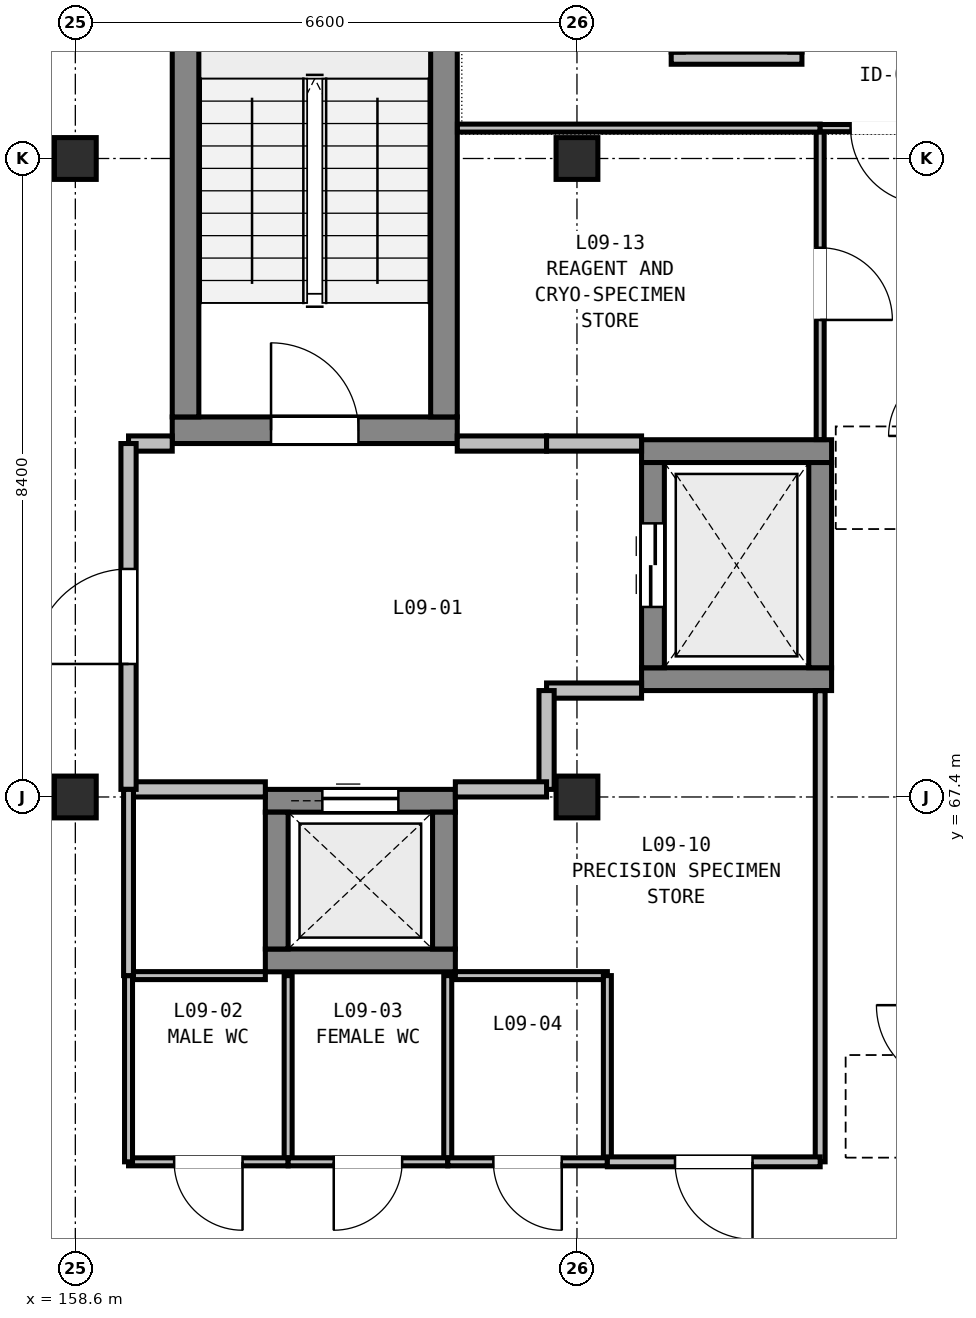
"""IFC4 building model, lengths in metres.
Left out: names, types, materials, properties, quantities, classifications, styles, units other than length and angle.
Written with IfcOpenShell. Run it as: python <this file> out.ifc"""

import sys

from ifc_helpers import new_model, si_unit, direction, frame, frame_2d, origin, origin_2d, place, context, subcontext, project, spatial, rectangle, extrude, element, fill, save


model = new_model("IFC4")
c1 = context("Model", 3, precision=1e-05, world=origin(), true_north=direction((0.0, 1.0)))
c2 = subcontext(c1, "Body", "Model", "MODEL_VIEW")
j1 = project(units=[si_unit("LENGTHUNIT", "METRE"), si_unit("PLANEANGLEUNIT", "RADIAN")], contexts=[c1])
p1 = place(None, origin())
s1 = spatial("IfcSite", under=j1, at=p1, CompositionType="ELEMENT")
p2 = place(p1, origin())
s2 = spatial("IfcBuilding", under=s1, at=p2, CompositionType="ELEMENT")
p3 = place(p2, frame((0.0, 0.0, 40.5)))
s3 = spatial("IfcBuildingStorey", under=s2, at=p3, CompositionType="ELEMENT", Elevation=40.5)
for number, where, z_axis, x_axis in (
    (1, (158.6, 67.4, 0.0), (0.0, 0.0, 1.0), (1.0, 0.0, 0.0)),
    (2, (158.6, 75.8, 0.0), (0.0, 0.0, 1.0), (1.0, 0.0, 0.0)),
    (3, (165.2, 67.4, 0.0), (0.0, 0.0, 1.0), (1.0, 0.0, 0.0)),
    (4, (165.2, 75.8, 0.0), (0.0, 0.0, 1.0), (1.0, 0.0, 0.0)),
):
    element("IfcColumn", number, at=place(p3, frame(where, z_axis=z_axis, x_axis=x_axis)), inside=s3, PredefinedType="COLUMN", context=c2, shape_type="SweptSolid", body=[
        extrude(rectangle(XDim=0.55, YDim=0.55, at=origin_2d()), origin(), (0.0, 0.0, 1.0), 3.9),
    ])
p4 = place(p3, frame((159.875, 72.225, 0.0), z_axis=(0.0, 0.0, 1.0), x_axis=(1.0, 0.0, 0.0)))
e5 = element("IfcWall", 5, at=p4, inside=s3, PredefinedType="SHEAR", context=c2, shape_type="SweptSolid", body=[
    extrude(rectangle(XDim=3.75, YDim=0.35, at=frame_2d((1.875, 0.0))), origin(), (0.0, 0.0, 1.0), 3.9),
])
p5 = place(p4, frame((1.3, 0.0, 0.0)))
e6 = element("IfcOpeningElement", 6, at=p5, cuts=e5, PredefinedType="OPENING", context=c2, shape_type="SweptSolid", body=[
    extrude(rectangle(XDim=1.15, YDim=2.15, at=frame_2d((0.575, 1.075))), frame((0.0, 0.185, 0.0), z_axis=(0.0, -1.0, 0.0), x_axis=(1.0, 0.0, 0.0)), (0.0, 0.0, 1.0), 0.37),
])
for number, where, z_axis, x_axis in (
    (7, (160.05, 72.4, 0.0), (0.0, 0.0, 1.0), (0.0, 1.0, 0.0)),
    (8, (163.45, 72.4, 0.0), (0.0, 0.0, 1.0), (0.0, 1.0, 0.0)),
):
    element("IfcWall", number, at=place(p3, frame(where, z_axis=z_axis, x_axis=x_axis)), inside=s3, PredefinedType="SHEAR", context=c2, shape_type="SweptSolid", body=[
        extrude(rectangle(XDim=7.375, YDim=0.35, at=frame_2d((3.688, 0.0))), origin(), (0.0, 0.0, 1.0), 3.9),
    ])
for number, where, z_axis, x_axis in (
    (9, (166.05, 68.95, 0.0), (0.0, 0.0, 1.0), (1.0, 0.0, 0.0)),
    (10, (166.05, 71.95, 0.0), (0.0, 0.0, 1.0), (1.0, 0.0, 0.0)),
):
    element("IfcWall", number, at=place(p3, frame(where, z_axis=z_axis, x_axis=x_axis)), inside=s3, PredefinedType="SHEAR", context=c2, shape_type="SweptSolid", body=[
        extrude(rectangle(XDim=2.5, YDim=0.3, at=frame_2d((1.25, 0.0))), origin(), (0.0, 0.0, 1.0), 3.9),
    ])
p6 = place(p3, frame((166.2, 69.1, 0.0), z_axis=(0.0, 0.0, 1.0), x_axis=(0.0, 1.0, 0.0)))
e11 = element("IfcWall", 11, at=p6, inside=s3, PredefinedType="SHEAR", context=c2, shape_type="SweptSolid", body=[
    extrude(rectangle(XDim=2.7, YDim=0.3, at=frame_2d((1.35, 0.0))), origin(), (0.0, 0.0, 1.0), 3.9),
])
p7 = place(p6, frame((0.8, 0.0, 0.0)))
e12 = element("IfcOpeningElement", 12, at=p7, cuts=e11, PredefinedType="OPENING", context=c2, shape_type="SweptSolid", body=[
    extrude(rectangle(XDim=1.1, YDim=2.1, at=frame_2d((0.55, 1.05))), frame((0.0, 0.16, 0.0), z_axis=(0.0, -1.0, 0.0), x_axis=(1.0, 0.0, 0.0)), (0.0, 0.0, 1.0), 0.32),
])
p8 = place(p3, frame((168.4, 69.1, 0.0), z_axis=(0.0, 0.0, 1.0), x_axis=(0.0, 1.0, 0.0)))
e13 = element("IfcWall", 13, at=p8, inside=s3, PredefinedType="SHEAR", context=c2, shape_type="SweptSolid", body=[
    extrude(rectangle(XDim=2.7, YDim=0.3, at=frame_2d((1.35, 0.0))), origin(), (0.0, 0.0, 1.0), 3.9),
])
p9 = place(p3, frame((161.1, 65.25, 0.0), z_axis=(0.0, 0.0, 1.0), x_axis=(1.0, 0.0, 0.0)))
e14 = element("IfcWall", 14, at=p9, inside=s3, PredefinedType="SHEAR", context=c2, shape_type="SweptSolid", body=[
    extrude(rectangle(XDim=2.5, YDim=0.3, at=frame_2d((1.25, 0.0))), origin(), (0.0, 0.0, 1.0), 3.9),
])
p10 = place(p3, frame((161.1, 67.35, 0.0), z_axis=(0.0, 0.0, 1.0), x_axis=(1.0, 0.0, 0.0)))
e15 = element("IfcWall", 15, at=p10, inside=s3, PredefinedType="SHEAR", context=c2, shape_type="SweptSolid", body=[
    extrude(rectangle(XDim=2.5, YDim=0.3, at=frame_2d((1.25, 0.0))), origin(), (0.0, 0.0, 1.0), 3.9),
])
p11 = place(p10, frame((0.75, 0.0, 0.0)))
e16 = element("IfcOpeningElement", 16, at=p11, cuts=e15, PredefinedType="OPENING", context=c2, shape_type="SweptSolid", body=[
    extrude(rectangle(XDim=1.0, YDim=2.1, at=frame_2d((0.5, 1.05))), frame((0.0, 0.16, 0.0), z_axis=(0.0, -1.0, 0.0), x_axis=(1.0, 0.0, 0.0)), (0.0, 0.0, 1.0), 0.32),
])
for number, where, z_axis, x_axis in (
    (17, (161.25, 65.4, 0.0), (0.0, 0.0, 1.0), (0.0, 1.0, 0.0)),
    (18, (163.45, 65.4, 0.0), (0.0, 0.0, 1.0), (0.0, 1.0, 0.0)),
):
    element("IfcWall", number, at=place(p3, frame(where, z_axis=z_axis, x_axis=x_axis)), inside=s3, PredefinedType="SHEAR", context=c2, shape_type="SweptSolid", body=[
        extrude(rectangle(XDim=1.8, YDim=0.3, at=frame_2d((0.9, 0.0))), origin(), (0.0, 0.0, 1.0), 3.9),
    ])
p12 = place(p3, frame((166.44, 77.12, 0.0), z_axis=(0.0, 0.0, 1.0), x_axis=(1.0, 0.0, 0.0)))
e19 = element("IfcWall", 19, at=p12, inside=s3, PredefinedType="PARTITIONING", context=c2, shape_type="SweptSolid", body=[
    extrude(rectangle(XDim=1.72, YDim=0.16, at=frame_2d((0.86, 0.0))), origin(), (0.0, 0.0, 1.0), 3.655),
])
p13 = place(p3, frame((159.3, 72.05, 0.0), z_axis=(0.0, 0.0, 1.0), x_axis=(1.0, 0.0, 0.0)))
e20 = element("IfcWall", 20, at=p13, inside=s3, PredefinedType="PARTITIONING", context=c2, shape_type="SweptSolid", body=[
    extrude(rectangle(XDim=0.575, YDim=0.2, at=frame_2d((0.288, 0.0))), origin(), (0.0, 0.0, 1.0), 3.655),
])
p14 = place(p3, frame((163.625, 72.05, 0.0), z_axis=(0.0, 0.0, 1.0), x_axis=(1.0, 0.0, 0.0)))
e21 = element("IfcWall", 21, at=p14, inside=s3, PredefinedType="PARTITIONING", context=c2, shape_type="SweptSolid", body=[
    extrude(rectangle(XDim=1.175, YDim=0.2, at=frame_2d((0.587, 0.0))), origin(), (0.0, 0.0, 1.0), 3.655),
])
for number, where, z_axis, x_axis in (
    (22, (164.8, 72.05, 0.0), (0.0, 0.0, 1.0), (1.0, 0.0, 0.0)),
    (23, (166.05, 68.8, 0.0), (0.0, 0.0, 1.0), (-1.0, 0.0, 0.0)),
):
    element("IfcWall", number, at=place(p3, frame(where, z_axis=z_axis, x_axis=x_axis)), inside=s3, PredefinedType="PARTITIONING", context=c2, shape_type="SweptSolid", body=[
        extrude(rectangle(XDim=1.25, YDim=0.2, at=frame_2d((0.625, 0.0))), origin(), (0.0, 0.0, 1.0), 3.185),
    ])
p15 = place(p3, frame((164.8, 68.8, 0.0), z_axis=(0.0, 0.0, 1.0), x_axis=(0.0, -1.0, 0.0)))
e24 = element("IfcWall", 24, at=p15, inside=s3, PredefinedType="PARTITIONING", context=c2, shape_type="SweptSolid", body=[
    extrude(rectangle(XDim=1.3, YDim=0.2, at=frame_2d((0.65, 0.0))), origin(), (0.0, 0.0, 1.0), 3.285),
])
p16 = place(p3, frame((164.8, 67.5, 0.0), z_axis=(0.0, 0.0, 1.0), x_axis=(-1.0, 0.0, 0.0)))
e25 = element("IfcWall", 25, at=p16, inside=s3, PredefinedType="PARTITIONING", context=c2, shape_type="SweptSolid", body=[
    extrude(rectangle(XDim=1.2, YDim=0.2, at=frame_2d((0.6, 0.0))), origin(), (0.0, 0.0, 1.0), 3.285),
])
p17 = place(p3, frame((161.1, 67.5, 0.0), z_axis=(0.0, 0.0, 1.0), x_axis=(-1.0, 0.0, 0.0)))
e26 = element("IfcWall", 26, at=p17, inside=s3, PredefinedType="PARTITIONING", context=c2, shape_type="SweptSolid", body=[
    extrude(rectangle(XDim=1.8, YDim=0.2, at=frame_2d((0.9, 0.0))), origin(), (0.0, 0.0, 1.0), 3.285),
])
p18 = place(p3, frame((159.3, 67.5, 0.0), z_axis=(0.0, 0.0, 1.0), x_axis=(0.0, 1.0, 0.0)))
e27 = element("IfcWall", 27, at=p18, inside=s3, PredefinedType="PARTITIONING", context=c2, shape_type="SweptSolid", body=[
    extrude(rectangle(XDim=4.55, YDim=0.2, at=frame_2d((2.275, 0.0))), origin(), (0.0, 0.0, 1.0), 3.285),
])
p19 = place(p18, frame((1.65, 0.0, 0.0)))
e28 = element("IfcOpeningElement", 28, at=p19, cuts=e27, PredefinedType="OPENING", context=c2, shape_type="SweptSolid", body=[
    extrude(rectangle(XDim=1.25, YDim=2.15, at=frame_2d((0.625, 1.075))), frame((0.0, 0.11, 0.0), z_axis=(0.0, -1.0, 0.0), x_axis=(1.0, 0.0, 0.0)), (0.0, 0.0, 1.0), 0.22),
])
p20 = place(p3, frame((159.3, 65.05, 0.0), z_axis=(0.0, 0.0, 1.0), x_axis=(1.0, 0.0, 0.0)))
e29 = element("IfcWall", 29, at=p20, inside=s3, PredefinedType="PARTITIONING", context=c2, shape_type="SweptSolid", body=[
    extrude(rectangle(XDim=1.8, YDim=0.105, at=frame_2d((0.9, 0.0))), origin(), (0.0, 0.0, 1.0), 3.655),
])
p21 = place(p3, frame((161.4, 65.05, 0.0), z_axis=(0.0, 0.0, 1.0), x_axis=(0.0, -1.0, 0.0)))
e30 = element("IfcWall", 30, at=p21, inside=s3, PredefinedType="PARTITIONING", context=c2, shape_type="SweptSolid", body=[
    extrude(rectangle(XDim=2.45, YDim=0.105, at=frame_2d((1.225, 0.0))), origin(), (0.0, 0.0, 1.0), 3.655),
])
p22 = place(p3, frame((161.4, 62.6, 0.0), z_axis=(0.0, 0.0, 1.0), x_axis=(-1.0, 0.0, 0.0)))
e31 = element("IfcWall", 31, at=p22, inside=s3, PredefinedType="PARTITIONING", context=c2, shape_type="SweptSolid", body=[
    extrude(rectangle(XDim=2.1, YDim=0.105, at=frame_2d((1.05, 0.0))), origin(), (0.0, 0.0, 1.0), 3.655),
])
p23 = place(p22, frame((0.6, 0.0, 0.0)))
e32 = element("IfcOpeningElement", 32, at=p23, cuts=e31, PredefinedType="OPENING", context=c2, shape_type="SweptSolid", body=[
    extrude(rectangle(XDim=0.9, YDim=2.02, at=frame_2d((0.45, 1.01))), frame((0.0, 0.062, 0.0), z_axis=(0.0, -1.0, 0.0), x_axis=(1.0, 0.0, 0.0)), (0.0, 0.0, 1.0), 0.125),
])
for number, where, z_axis, x_axis in (
    (33, (159.3, 62.6, 0.0), (0.0, 0.0, 1.0), (0.0, 1.0, 0.0)),
    (34, (163.5, 65.05, 0.0), (0.0, 0.0, 1.0), (0.0, -1.0, 0.0)),
):
    element("IfcWall", number, at=place(p3, frame(where, z_axis=z_axis, x_axis=x_axis)), inside=s3, PredefinedType="PARTITIONING", context=c2, shape_type="SweptSolid", body=[
        extrude(rectangle(XDim=2.45, YDim=0.105, at=frame_2d((1.225, 0.0))), origin(), (0.0, 0.0, 1.0), 3.655),
    ])
p24 = place(p3, frame((163.5, 62.6, 0.0), z_axis=(0.0, 0.0, 1.0), x_axis=(-1.0, 0.0, 0.0)))
e35 = element("IfcWall", 35, at=p24, inside=s3, PredefinedType="PARTITIONING", context=c2, shape_type="SweptSolid", body=[
    extrude(rectangle(XDim=2.1, YDim=0.105, at=frame_2d((1.05, 0.0))), origin(), (0.0, 0.0, 1.0), 3.655),
])
p25 = place(p24, frame((0.6, 0.0, 0.0)))
e36 = element("IfcOpeningElement", 36, at=p25, cuts=e35, PredefinedType="OPENING", context=c2, shape_type="SweptSolid", body=[
    extrude(rectangle(XDim=0.9, YDim=2.02, at=frame_2d((0.45, 1.01))), frame((0.0, 0.062, 0.0), z_axis=(0.0, -1.0, 0.0), x_axis=(1.0, 0.0, 0.0)), (0.0, 0.0, 1.0), 0.125),
])
p26 = place(p3, frame((163.6, 65.05, 0.0), z_axis=(0.0, 0.0, 1.0), x_axis=(1.0, 0.0, 0.0)))
e37 = element("IfcWall", 37, at=p26, inside=s3, PredefinedType="PARTITIONING", context=c2, shape_type="SweptSolid", body=[
    extrude(rectangle(XDim=2.0, YDim=0.105, at=frame_2d((1.0, 0.0))), origin(), (0.0, 0.0, 1.0), 3.185),
])
p27 = place(p3, frame((165.6, 65.05, 0.0), z_axis=(0.0, 0.0, 1.0), x_axis=(0.0, -1.0, 0.0)))
e38 = element("IfcWall", 38, at=p27, inside=s3, PredefinedType="PARTITIONING", context=c2, shape_type="SweptSolid", body=[
    extrude(rectangle(XDim=2.45, YDim=0.105, at=frame_2d((1.225, 0.0))), origin(), (0.0, 0.0, 1.0), 3.655),
])
p28 = place(p3, frame((165.6, 62.6, 0.0), z_axis=(0.0, 0.0, 1.0), x_axis=(-1.0, 0.0, 0.0)))
e39 = element("IfcWall", 39, at=p28, inside=s3, PredefinedType="PARTITIONING", context=c2, shape_type="SweptSolid", body=[
    extrude(rectangle(XDim=2.1, YDim=0.105, at=frame_2d((1.05, 0.0))), origin(), (0.0, 0.0, 1.0), 3.185),
])
p29 = place(p28, frame((0.6, 0.0, 0.0)))
e40 = element("IfcOpeningElement", 40, at=p29, cuts=e39, PredefinedType="OPENING", context=c2, shape_type="SweptSolid", body=[
    extrude(rectangle(XDim=0.9, YDim=2.02, at=frame_2d((0.45, 1.01))), frame((0.0, 0.062, 0.0), z_axis=(0.0, -1.0, 0.0), x_axis=(1.0, 0.0, 0.0)), (0.0, 0.0, 1.0), 0.125),
])
p30 = place(p3, frame((168.4, 68.798, 0.0), z_axis=(0.0, 0.0, 1.0), x_axis=(0.0, -1.0, 0.0)))
e41 = element("IfcWall", 41, at=p30, inside=s3, PredefinedType="PARTITIONING", context=c2, shape_type="SweptSolid", body=[
    extrude(rectangle(XDim=6.198, YDim=0.13, at=frame_2d((3.099, 0.0))), origin(), (0.0, 0.0, 1.0), 3.285),
])
p31 = place(p3, frame((168.4, 62.6, 0.0), z_axis=(0.0, 0.0, 1.0), x_axis=(-1.0, 0.0, 0.0)))
e42 = element("IfcWall", 42, at=p31, inside=s3, PredefinedType="PARTITIONING", context=c2, shape_type="SweptSolid", body=[
    extrude(rectangle(XDim=2.8, YDim=0.13, at=frame_2d((1.4, 0.0))), origin(), (0.0, 0.0, 1.0), 3.435),
])
p32 = place(p31, frame((0.89, 0.0, 0.0)))
e43 = element("IfcOpeningElement", 43, at=p32, cuts=e42, PredefinedType="OPENING", context=c2, shape_type="SweptSolid", body=[
    extrude(rectangle(XDim=1.02, YDim=2.02, at=frame_2d((0.51, 1.01))), frame((0.0, 0.075, 0.0), z_axis=(0.0, -1.0, 0.0), x_axis=(1.0, 0.0, 0.0)), (0.0, 0.0, 1.0), 0.15),
])
p33 = place(p3, frame((159.3, 65.05, 0.0), z_axis=(0.0, 0.0, 1.0), x_axis=(0.0, 1.0, 0.0)))
e44 = element("IfcWall", 44, at=p33, inside=s3, PredefinedType="PARTITIONING", context=c2, shape_type="SweptSolid", body=[
    extrude(rectangle(XDim=2.45, YDim=0.13, at=frame_2d((1.225, 0.0))), origin(), (0.0, 0.0, 1.0), 3.285),
])
p34 = place(p3, frame((168.4, 76.2, 0.0), z_axis=(0.0, 0.0, 1.0), x_axis=(0.0, -1.0, 0.0)))
e45 = element("IfcWall", 45, at=p34, inside=s3, PredefinedType="PARTITIONING", context=c2, shape_type="SweptSolid", body=[
    extrude(rectangle(XDim=4.098, YDim=0.105, at=frame_2d((2.049, 0.0))), origin(), (0.0, 0.0, 1.0), 3.285),
])
p35 = place(p34, frame((1.574, 0.0, 0.0)))
e46 = element("IfcOpeningElement", 46, at=p35, cuts=e45, PredefinedType="OPENING", context=c2, shape_type="SweptSolid", body=[
    extrude(rectangle(XDim=0.95, YDim=2.06, at=frame_2d((0.475, 1.03))), frame((0.0, 0.062, 0.0), z_axis=(0.0, -1.0, 0.0), x_axis=(1.0, 0.0, 0.0)), (0.0, 0.0, 1.0), 0.125),
])
p36 = place(p3, frame((163.627, 76.2, 0.0), z_axis=(0.0, 0.0, 1.0), x_axis=(1.0, 0.0, 0.0)))
e47 = element("IfcWall", 47, at=p36, inside=s3, PredefinedType="PARTITIONING", context=c2, shape_type="SweptSolid", body=[
    extrude(rectangle(XDim=4.773, YDim=0.105, at=frame_2d((2.386, 0.0))), origin(), (0.0, 0.0, 1.0), 3.185),
])
p37 = place(p3, frame((170.2, 76.2, 0.0), z_axis=(0.0, 0.0, 1.0), x_axis=(-1.0, 0.0, 0.0)))
e48 = element("IfcWall", 48, at=p37, inside=s3, PredefinedType="PARTITIONING", context=c2, shape_type="SweptSolid", body=[
    extrude(rectangle(XDim=1.8, YDim=0.095, at=frame_2d((0.9, 0.0))), origin(), (0.0, 0.0, 1.0), 3.435),
])
p38 = place(p37, frame((0.4, 0.0, 0.0)))
e49 = element("IfcOpeningElement", 49, at=p38, cuts=e48, PredefinedType="OPENING", context=c2, shape_type="SweptSolid", body=[
    extrude(rectangle(XDim=1.0, YDim=2.06, at=frame_2d((0.5, 1.03))), frame((0.0, 0.057, 0.0), z_axis=(0.0, -1.0, 0.0), x_axis=(1.0, 0.0, 0.0)), (0.0, 0.0, 1.0), 0.115),
])
p39 = place(p5, origin())
e50 = element("IfcDoor", 50, at=p39, inside=s3, OperationType="SINGLE_SWING_LEFT", PredefinedType="DOOR", context=c2, shape_type="SweptSolid", body=[
    extrude(rectangle(XDim=1.15, YDim=2.15, at=frame_2d((0.575, 1.075))), frame((0.0, 0.025, 0.0), z_axis=(0.0, -1.0, 0.0), x_axis=(1.0, 0.0, 0.0)), (0.0, 0.0, 1.0), 0.05),
])
fill(e6, e50)
p40 = place(p7, origin())
e51 = element("IfcDoor", 51, at=p40, inside=s3, OperationType="DOUBLE_DOOR_SLIDING", PredefinedType="DOOR", context=c2, shape_type="SweptSolid", body=[
    extrude(rectangle(XDim=1.1, YDim=2.1, at=frame_2d((0.55, 1.05))), frame((0.0, 0.025, 0.0), z_axis=(0.0, -1.0, 0.0), x_axis=(1.0, 0.0, 0.0)), (0.0, 0.0, 1.0), 0.05),
])
fill(e12, e51)
p41 = place(p11, origin())
e52 = element("IfcDoor", 52, at=p41, inside=s3, OperationType="SLIDING_TO_LEFT", PredefinedType="DOOR", context=c2, shape_type="SweptSolid", body=[
    extrude(rectangle(XDim=1.0, YDim=2.1, at=frame_2d((0.5, 1.05))), frame((0.0, 0.025, 0.0), z_axis=(0.0, -1.0, 0.0), x_axis=(1.0, 0.0, 0.0)), (0.0, 0.0, 1.0), 0.05),
])
fill(e16, e52)
p42 = place(p19, origin())
e53 = element("IfcDoor", 53, at=p42, inside=s3, OperationType="SINGLE_SWING_LEFT", PredefinedType="DOOR", context=c2, shape_type="SweptSolid", body=[
    extrude(rectangle(XDim=1.25, YDim=2.15, at=frame_2d((0.625, 1.075))), frame((0.0, 0.025, 0.0), z_axis=(0.0, -1.0, 0.0), x_axis=(1.0, 0.0, 0.0)), (0.0, 0.0, 1.0), 0.05),
])
fill(e28, e53)
p43 = place(p23, origin())
e54 = element("IfcDoor", 54, at=p43, inside=s3, OperationType="SINGLE_SWING_LEFT", PredefinedType="DOOR", context=c2, shape_type="SweptSolid", body=[
    extrude(rectangle(XDim=0.9, YDim=2.02, at=frame_2d((0.45, 1.01))), frame((0.0, 0.025, 0.0), z_axis=(0.0, -1.0, 0.0), x_axis=(1.0, 0.0, 0.0)), (0.0, 0.0, 1.0), 0.05),
])
fill(e32, e54)
p44 = place(p25, origin())
e55 = element("IfcDoor", 55, at=p44, inside=s3, OperationType="SINGLE_SWING_RIGHT", PredefinedType="DOOR", context=c2, shape_type="SweptSolid", body=[
    extrude(rectangle(XDim=0.9, YDim=2.02, at=frame_2d((0.45, 1.01))), frame((0.0, 0.025, 0.0), z_axis=(0.0, -1.0, 0.0), x_axis=(1.0, 0.0, 0.0)), (0.0, 0.0, 1.0), 0.05),
])
fill(e36, e55)
p45 = place(p29, origin())
e56 = element("IfcDoor", 56, at=p45, inside=s3, OperationType="SINGLE_SWING_LEFT", PredefinedType="DOOR", context=c2, shape_type="SweptSolid", body=[
    extrude(rectangle(XDim=0.9, YDim=2.02, at=frame_2d((0.45, 1.01))), frame((0.0, 0.025, 0.0), z_axis=(0.0, -1.0, 0.0), x_axis=(1.0, 0.0, 0.0)), (0.0, 0.0, 1.0), 0.05),
])
fill(e40, e56)
p46 = place(p32, origin())
e57 = element("IfcDoor", 57, at=p46, inside=s3, OperationType="SINGLE_SWING_LEFT", PredefinedType="DOOR", context=c2, shape_type="SweptSolid", body=[
    extrude(rectangle(XDim=1.02, YDim=2.02, at=frame_2d((0.51, 1.01))), frame((0.0, 0.025, 0.0), z_axis=(0.0, -1.0, 0.0), x_axis=(1.0, 0.0, 0.0)), (0.0, 0.0, 1.0), 0.05),
])
fill(e43, e57)
p47 = place(p35, origin())
e58 = element("IfcDoor", 58, at=p47, inside=s3, OperationType="SINGLE_SWING_RIGHT", PredefinedType="DOOR", context=c2, shape_type="SweptSolid", body=[
    extrude(rectangle(XDim=0.95, YDim=2.06, at=frame_2d((0.475, 1.03))), frame((0.0, 0.025, 0.0), z_axis=(0.0, -1.0, 0.0), x_axis=(1.0, 0.0, 0.0)), (0.0, 0.0, 1.0), 0.05),
])
fill(e46, e58)
p48 = place(p38, origin())
e59 = element("IfcDoor", 59, at=p48, inside=s3, OperationType="SINGLE_SWING_LEFT", PredefinedType="DOOR", context=c2, shape_type="SweptSolid", body=[
    extrude(rectangle(XDim=1.0, YDim=2.06, at=frame_2d((0.5, 1.03))), frame((0.0, 0.025, 0.0), z_axis=(0.0, -1.0, 0.0), x_axis=(1.0, 0.0, 0.0)), (0.0, 0.0, 1.0), 0.05),
])
fill(e49, e59)
save(model, sys.argv[1])
